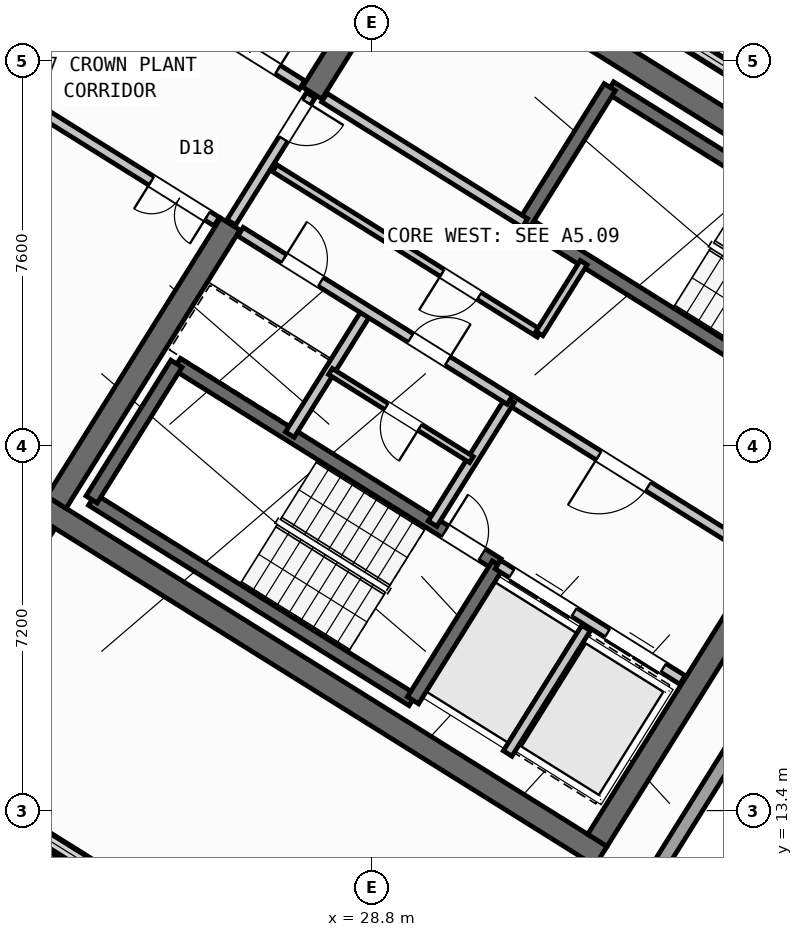
"""IFC4 building model, lengths in metres.
Left out: names, types, materials, properties, quantities, classifications, styles, units other than length and angle.
Written with IfcOpenShell. Run it as: python <this file> out.ifc"""

import sys

from ifc_helpers import new_model, si_unit, direction, frame, frame_2d, origin, origin_2d, place, context, subcontext, project, spatial, rectangle, hollow_rectangle, extrude, source, transform, mapped, element, fill, save


model = new_model("IFC4")
c1 = context("Model", 3, precision=1e-05, world=origin(), true_north=direction((0.0, 1.0)))
c2 = subcontext(c1, "Body", "Model", "MODEL_VIEW")
j1 = project(units=[si_unit("LENGTHUNIT", "METRE"), si_unit("PLANEANGLEUNIT", "RADIAN")], contexts=[c1])
p1 = place(None, origin())
s1 = spatial("IfcSite", under=j1, at=p1, CompositionType="ELEMENT")
p2 = place(p1, origin())
s2 = spatial("IfcBuilding", under=s1, at=p2, CompositionType="ELEMENT")
p3 = place(p2, frame((0.0, 0.0, 302.4)))
s3 = spatial("IfcBuildingStorey", under=s2, at=p3, CompositionType="ELEMENT", Elevation=302.4)
p4 = place(p3, frame((40.531, 24.036, 0.0), z_axis=(0.0, 0.0, 1.0), x_axis=(-0.848048787466, 0.529918157905, 0.0)))
e1 = element("IfcWall", 1, at=p4, inside=s3, PredefinedType="SHEAR", context=c2, shape_type="SweptSolid", body=[
    extrude(rectangle(XDim=13.04, YDim=0.45, at=frame_2d((6.52, 0.0))), origin(), (0.0, 0.0, 1.0), 3.32),
])
p5 = place(p3, frame((33.324, 12.503, 0.0), z_axis=(0.0, 0.0, 1.0), x_axis=(-0.848043529849, 0.529926571782, 0.0)))
e2 = element("IfcWall", 2, at=p5, inside=s3, PredefinedType="SHEAR", context=c2, shape_type="SweptSolid", body=[
    extrude(rectangle(XDim=13.04, YDim=0.45, at=frame_2d((6.52, 0.0))), origin(), (0.0, 0.0, 1.0), 3.32),
])
p6 = place(p3, frame((36.683, 18.304, 0.0), z_axis=(0.0, 0.0, 1.0), x_axis=(-0.529904039071, -0.848057609704, 0.0)))
e3 = element("IfcWall", 3, at=p6, inside=s3, PredefinedType="SHEAR", context=c2, shape_type="SweptSolid", body=[
    extrude(rectangle(XDim=6.475, YDim=0.45, at=frame_2d((3.238, 0.0))), origin(), (0.0, 0.0, 1.0), 3.32),
])
p7 = place(p3, frame((29.544, 30.636, 0.0), z_axis=(0.0, 0.0, 1.0), x_axis=(-0.529902075036, -0.848058836916, 0.0)))
e4 = element("IfcWall", 4, at=p7, inside=s3, PredefinedType="SHEAR", context=c2, shape_type="SweptSolid", body=[
    extrude(rectangle(XDim=3.625, YDim=0.45, at=frame_2d((1.812, 0.0))), origin(), (0.0, 0.0, 1.0), 3.32),
])
p8 = place(p3, frame((26.007, 24.976, 0.0), z_axis=(0.0, 0.0, 1.0), x_axis=(-0.529931155655, -0.848040665456, 0.0)))
e5 = element("IfcWall", 5, at=p8, inside=s3, PredefinedType="SHEAR", context=c2, shape_type="SweptSolid", body=[
    extrude(rectangle(XDim=6.475, YDim=0.45, at=frame_2d((3.238, 0.0))), origin(), (0.0, 0.0, 1.0), 3.32),
])
m1 = source(origin(), c2, "Body", "SweptSolid", [
    extrude(hollow_rectangle(XDim=0.5, YDim=0.5, WallThickness=0.025, at=origin_2d()), origin(), (0.0, 0.0, 1.0), 3.6),
])
p9 = place(p3, frame((22.191, 18.87, 0.0), z_axis=(0.0, 0.0, 1.0), x_axis=(-0.848048096156, 0.529919264233, 0.0)))
e6 = element("IfcColumn", 6, at=p9, inside=s3, PredefinedType="COLUMN", context=c2, shape_type="MappedRepresentation", body=[
    mapped(m1, transform((0.0, 0.0, 0.0), scale=1.0)),
])
p10 = place(p3, frame((29.124, 7.286, 0.0), z_axis=(0.0, 0.0, 1.0), x_axis=(-0.848048671495, 0.529918343499, 0.0)))
e7 = element("IfcWall", 7, at=p10, inside=s3, PredefinedType="PARAPET", context=c2, shape_type="SweptSolid", body=[
    extrude(rectangle(XDim=22.056, YDim=0.24, at=frame_2d((11.028, 0.0))), origin(), (0.0, 0.0, 1.0), 1.15),
])
p11 = place(p3, frame((12.5, 18.652, 0.0), z_axis=(0.0, 0.0, 1.0), x_axis=(0.848048578208, -0.529918492789, 0.0)))
e8 = element("IfcWall", 8, at=p11, inside=s3, PredefinedType="PARAPET", context=c2, shape_type="SweptSolid", body=[
    extrude(rectangle(XDim=20.187, YDim=0.24, at=frame_2d((10.094, 0.0))), origin(), (0.0, 0.0, 1.0), 1.15),
])
p12 = place(p3, frame((41.182, 23.031, 0.0), z_axis=(0.0, 0.0, 1.0), x_axis=(-0.529918482735, -0.84804858449, 0.0)))
e9 = element("IfcWall", 9, at=p12, inside=s3, PredefinedType="STANDARD", context=c2, shape_type="SweptSolid", body=[
    extrude(rectangle(XDim=17.184, YDim=0.28, at=frame_2d((8.592, 0.0))), origin(), (0.0, 0.0, 1.0), 3.32),
])
p13 = place(p12, frame((7.967, 0.0, 0.95)))
e10 = element("IfcOpeningElement", 10, at=p13, cuts=e9, PredefinedType="OPENING", context=c2, shape_type="SweptSolid", body=[
    extrude(rectangle(XDim=1.25, YDim=1.4, at=frame_2d((0.625, 0.7))), frame((0.0, 0.15, 0.0), z_axis=(0.0, -1.0, 0.0), x_axis=(1.0, 0.0, 0.0)), (0.0, 0.0, 1.0), 0.3),
])
p14 = place(p3, frame((30.122, 8.007, 0.0), z_axis=(0.0, 0.0, 1.0), x_axis=(-0.848046669074, 0.529921548036, 0.0)))
e11 = element("IfcWall", 11, at=p14, inside=s3, PredefinedType="STANDARD", context=c2, shape_type="SweptSolid", body=[
    extrude(rectangle(XDim=20.984, YDim=0.28, at=frame_2d((10.492, 0.0))), origin(), (0.0, 0.0, 1.0), 3.32),
])
p15 = place(p14, frame((8.009, 0.0, 0.95)))
e12 = element("IfcOpeningElement", 12, at=p15, cuts=e11, PredefinedType="OPENING", context=c2, shape_type="SweptSolid", body=[
    extrude(rectangle(XDim=1.25, YDim=1.4, at=frame_2d((0.625, 0.7))), frame((0.0, 0.15, 0.0), z_axis=(0.0, -1.0, 0.0), x_axis=(1.0, 0.0, 0.0)), (0.0, 0.0, 1.0), 0.3),
])
p16 = place(p14, frame((18.601, 0.0, 0.95)))
e13 = element("IfcOpeningElement", 13, at=p16, cuts=e11, PredefinedType="OPENING", context=c2, shape_type="SweptSolid", body=[
    extrude(rectangle(XDim=1.25, YDim=1.4, at=frame_2d((0.625, 0.7))), frame((0.0, 0.15, 0.0), z_axis=(0.0, -1.0, 0.0), x_axis=(1.0, 0.0, 0.0)), (0.0, 0.0, 1.0), 0.3),
])
p17 = place(p3, frame((22.935, 36.104, 0.0), z_axis=(0.0, 0.0, 1.0), x_axis=(0.848046669074, -0.529921548036, 0.0)))
e14 = element("IfcWall", 14, at=p17, inside=s3, PredefinedType="STANDARD", context=c2, shape_type="SweptSolid", body=[
    extrude(rectangle(XDim=20.984, YDim=0.28, at=frame_2d((10.492, 0.0))), origin(), (0.0, 0.0, 1.0), 3.32),
])
p18 = place(p17, frame((3.551, 0.0, 0.95)))
e15 = element("IfcOpeningElement", 15, at=p18, cuts=e14, PredefinedType="OPENING", context=c2, shape_type="SweptSolid", body=[
    extrude(rectangle(XDim=1.25, YDim=1.4, at=frame_2d((0.625, 0.7))), frame((0.0, 0.15, 0.0), z_axis=(0.0, -1.0, 0.0), x_axis=(1.0, 0.0, 0.0)), (0.0, 0.0, 1.0), 0.3),
])
p19 = place(p17, frame((14.193, 0.0, 0.95)))
e16 = element("IfcOpeningElement", 16, at=p19, cuts=e14, PredefinedType="OPENING", context=c2, shape_type="SweptSolid", body=[
    extrude(rectangle(XDim=1.25, YDim=1.4, at=frame_2d((0.625, 0.7))), frame((0.0, 0.15, 0.0), z_axis=(0.0, -1.0, 0.0), x_axis=(1.0, 0.0, 0.0)), (0.0, 0.0, 1.0), 0.3),
])
p20 = place(p3, frame((29.605, 15.581, 0.0), z_axis=(0.0, 0.0, 1.0), x_axis=(-0.848036911448, 0.529937163087, 0.0)))
e17 = element("IfcWall", 17, at=p20, inside=s3, PredefinedType="SHEAR", context=c2, shape_type="SweptSolid", body=[
    extrude(rectangle(XDim=7.46, YDim=0.26, at=frame_2d((3.73, 0.0))), origin(), (0.0, 0.0, 1.0), 3.32),
])
p21 = place(p3, frame((31.28, 18.261, 0.0), z_axis=(0.0, 0.0, 1.0), x_axis=(-0.848051618787, 0.529913626805, 0.0)))
e18 = element("IfcWall", 18, at=p21, inside=s3, PredefinedType="SHEAR", context=c2, shape_type="SweptSolid", body=[
    extrude(rectangle(XDim=7.46, YDim=0.26, at=frame_2d((3.73, 0.0))), origin(), (0.0, 0.0, 1.0), 3.32),
])
p22 = place(p21, frame((0.36, 0.0, 0.0)))
e19 = element("IfcOpeningElement", 19, at=p22, cuts=e18, PredefinedType="OPENING", context=c2, shape_type="SweptSolid", body=[
    extrude(rectangle(XDim=0.86, YDim=2.05, at=frame_2d((0.43, 1.025))), frame((0.0, 0.14, 0.0), z_axis=(0.0, -1.0, 0.0), x_axis=(1.0, 0.0, 0.0)), (0.0, 0.0, 1.0), 0.28),
])
p23 = place(p3, frame((31.288, 18.256, 0.0), z_axis=(0.0, 0.0, 1.0), x_axis=(-0.529943379326, -0.848033026897, 0.0)))
e20 = element("IfcWall", 20, at=p23, inside=s3, PredefinedType="SHEAR", context=c2, shape_type="SweptSolid", body=[
    extrude(rectangle(XDim=3.16, YDim=0.26, at=frame_2d((1.58, 0.0))), origin(), (0.0, 0.0, 1.0), 3.32),
])
p24 = place(p3, frame((24.945, 22.22, 0.0), z_axis=(0.0, 0.0, 1.0), x_axis=(-0.529908658664, -0.84805472316, 0.0)))
e21 = element("IfcWall", 21, at=p24, inside=s3, PredefinedType="SHEAR", context=c2, shape_type="SweptSolid", body=[
    extrude(rectangle(XDim=3.16, YDim=0.26, at=frame_2d((1.58, 0.0))), origin(), (0.0, 0.0, 1.0), 3.32),
])
p25 = place(p3, frame((39.721, 23.788, 0.0), z_axis=(0.0, 0.0, 1.0), x_axis=(-0.848054434086, 0.529909121291, 0.0)))
e22 = element("IfcWall", 22, at=p25, inside=s3, PredefinedType="SHEAR", context=c2, shape_type="SweptSolid", body=[
    extrude(rectangle(XDim=7.33, YDim=0.26, at=frame_2d((3.665, 0.0))), origin(), (0.0, 0.0, 1.0), 3.32),
])
p26 = place(p3, frame((38.046, 21.108, 0.0), z_axis=(0.0, 0.0, 1.0), x_axis=(-0.848054434086, 0.529909121291, 0.0)))
e23 = element("IfcWall", 23, at=p26, inside=s3, PredefinedType="SHEAR", context=c2, shape_type="SweptSolid", body=[
    extrude(rectangle(XDim=7.33, YDim=0.26, at=frame_2d((3.665, 0.0))), origin(), (0.0, 0.0, 1.0), 3.32),
])
p27 = place(p26, frame((0.22, 0.0, 0.0)))
e24 = element("IfcOpeningElement", 24, at=p27, cuts=e23, PredefinedType="OPENING", context=c2, shape_type="SweptSolid", body=[
    extrude(rectangle(XDim=1.1, YDim=2.1, at=frame_2d((0.55, 1.05))), frame((0.0, 0.14, 0.0), z_axis=(0.0, -1.0, 0.0), x_axis=(1.0, 0.0, 0.0)), (0.0, 0.0, 1.0), 0.28),
])
p28 = place(p3, frame((33.496, 27.677, 0.0), z_axis=(0.0, 0.0, 1.0), x_axis=(-0.529908658664, -0.84805472316, 0.0)))
e25 = element("IfcWall", 25, at=p28, inside=s3, PredefinedType="SHEAR", context=c2, shape_type="SweptSolid", body=[
    extrude(rectangle(XDim=3.16, YDim=0.26, at=frame_2d((1.58, 0.0))), origin(), (0.0, 0.0, 1.0), 3.32),
])
p29 = place(p3, frame((34.933, 15.978, 0.0), z_axis=(0.0, 0.0, 1.0), x_axis=(-0.848055739377, 0.529907032327, 0.0)))
e26 = element("IfcWall", 26, at=p29, inside=s3, PredefinedType="STANDARD", context=c2, shape_type="SweptSolid", body=[
    extrude(rectangle(XDim=4.298, YDim=0.2, at=frame_2d((2.149, 0.0))), origin(), (0.0, 0.0, 1.0), 3.31),
])
p30 = place(p29, frame((0.448, 0.0, 0.0)))
e27 = element("IfcOpeningElement", 27, at=p30, cuts=e26, PredefinedType="OPENING", context=c2, shape_type="SweptSolid", body=[
    extrude(rectangle(XDim=1.3, YDim=2.2, at=frame_2d((0.65, 1.1))), frame((0.0, 0.11, 0.0), z_axis=(0.0, -1.0, 0.0), x_axis=(1.0, 0.0, 0.0)), (0.0, 0.0, 1.0), 0.22),
])
p31 = place(p29, frame((2.523, 0.0, 0.0)))
e28 = element("IfcOpeningElement", 28, at=p31, cuts=e26, PredefinedType="OPENING", context=c2, shape_type="SweptSolid", body=[
    extrude(rectangle(XDim=1.45, YDim=2.25, at=frame_2d((0.725, 1.125))), frame((0.0, 0.11, 0.0), z_axis=(0.0, -1.0, 0.0), x_axis=(1.0, 0.0, 0.0)), (0.0, 0.0, 1.0), 0.22),
])
p32 = place(p3, frame((36.459, 18.421, 0.0), z_axis=(0.0, 0.0, 1.0), x_axis=(-0.848059591691, 0.529900867089, 0.0)))
e29 = element("IfcWall", 29, at=p32, inside=s3, PredefinedType="STANDARD", context=c2, shape_type="SweptSolid", body=[
    extrude(rectangle(XDim=5.818, YDim=0.2, at=frame_2d((2.909, 0.0))), origin(), (0.0, 0.0, 1.0), 3.31),
])
p33 = place(p32, frame((2.598, 0.0, 0.0)))
e30 = element("IfcOpeningElement", 30, at=p33, cuts=e29, PredefinedType="OPENING", context=c2, shape_type="SweptSolid", body=[
    extrude(rectangle(XDim=1.15, YDim=2.1, at=frame_2d((0.575, 1.05))), frame((0.0, 0.11, 0.0), z_axis=(0.0, -1.0, 0.0), x_axis=(1.0, 0.0, 0.0)), (0.0, 0.0, 1.0), 0.22),
])
p34 = place(p3, frame((31.822, 24.998, 0.0), z_axis=(0.0, 0.0, 1.0), x_axis=(-0.848054125777, 0.529909614701, 0.0)))
e31 = element("IfcWall", 31, at=p34, inside=s3, PredefinedType="STANDARD", context=c2, shape_type="SweptSolid", body=[
    extrude(rectangle(XDim=4.668, YDim=0.2, at=frame_2d((2.334, 0.0))), origin(), (0.0, 0.0, 1.0), 3.31),
])
p35 = place(p3, frame((32.108, 22.814, 0.0), z_axis=(0.0, 0.0, 1.0), x_axis=(-0.848047283855, 0.529920564185, 0.0)))
e32 = element("IfcWall", 32, at=p35, inside=s3, PredefinedType="PARTITIONING", context=c2, shape_type="SweptSolid", body=[
    extrude(rectangle(XDim=6.16, YDim=0.16, at=frame_2d((3.08, 0.0))), origin(), (0.0, 0.0, 1.0), 3.31),
])
p36 = place(p35, frame((1.4, 0.0, 0.0)))
e33 = element("IfcOpeningElement", 33, at=p36, cuts=e32, PredefinedType="OPENING", context=c2, shape_type="SweptSolid", body=[
    extrude(rectangle(XDim=0.86, YDim=2.05, at=frame_2d((0.43, 1.025))), frame((0.0, 0.09, 0.0), z_axis=(0.0, -1.0, 0.0), x_axis=(1.0, 0.0, 0.0)), (0.0, 0.0, 1.0), 0.18),
])
p37 = place(p3, frame((32.982, 24.213, 0.0), z_axis=(0.0, 0.0, 1.0), x_axis=(-0.529839334948, -0.84809803628, 0.0)))
e34 = element("IfcWall", 34, at=p37, inside=s3, PredefinedType="PARTITIONING", context=c2, shape_type="SweptSolid", body=[
    extrude(rectangle(XDim=1.65, YDim=0.16, at=frame_2d((0.825, 0.0))), origin(), (0.0, 0.0, 1.0), 3.31),
])
p38 = place(p3, frame((33.029, 17.003, 0.0), z_axis=(0.0, 0.0, 1.0), x_axis=(-0.529916267533, -0.848049968695, 0.0)))
e35 = element("IfcWall", 35, at=p38, inside=s3, PredefinedType="STANDARD", context=c2, shape_type="SweptSolid", body=[
    extrude(rectangle(XDim=2.92, YDim=0.2, at=frame_2d((1.46, 0.0))), origin(), (0.0, 0.0, 1.0), 3.31),
])
for number, where, z_axis, x_axis in (
    (36, (31.525, 21.504, 0.0), (0.0, 0.0, 1.0), (-0.53, -0.848, 0.0)),
    (37, (28.71, 23.263, 0.0), (0.0, 0.0, 1.0), (-0.53, -0.848, 0.0)),
):
    element("IfcWall", number, at=place(p3, frame(where, z_axis=z_axis, x_axis=x_axis)), inside=s3, PredefinedType="STANDARD", context=c2, shape_type="SweptSolid", body=[
        extrude(rectangle(XDim=2.88, YDim=0.2, at=frame_2d((1.44, 0.0))), origin(), (0.0, 0.0, 1.0), 3.31),
    ])
p39 = place(p3, frame((31.525, 21.504, 0.0), z_axis=(0.0, 0.0, 1.0), x_axis=(-0.848042066329, 0.529928913853, 0.0)))
e38 = element("IfcWall", 38, at=p39, inside=s3, PredefinedType="STANDARD", context=c2, shape_type="SweptSolid", body=[
    extrude(rectangle(XDim=6.268, YDim=0.2, at=frame_2d((3.134, 0.0))), origin(), (0.0, 0.0, 1.0), 3.31),
])
p40 = place(p39, frame((4.4, 0.0, 0.0)))
e39 = element("IfcOpeningElement", 39, at=p40, cuts=e38, PredefinedType="OPENING", context=c2, shape_type="SweptSolid", body=[
    extrude(rectangle(XDim=0.86, YDim=2.05, at=frame_2d((0.43, 1.025))), frame((0.0, 0.11, 0.0), z_axis=(0.0, -1.0, 0.0), x_axis=(1.0, 0.0, 0.0)), (0.0, 0.0, 1.0), 0.22),
])
p41 = place(p39, frame((1.45, 0.0, 0.0)))
e40 = element("IfcOpeningElement", 40, at=p41, cuts=e38, PredefinedType="OPENING", context=c2, shape_type="SweptSolid", body=[
    extrude(rectangle(XDim=0.86, YDim=2.05, at=frame_2d((0.43, 1.025))), frame((0.0, 0.11, 0.0), z_axis=(0.0, -1.0, 0.0), x_axis=(1.0, 0.0, 0.0)), (0.0, 0.0, 1.0), 0.22),
])
p42 = place(p3, frame((30.766, 20.327, 0.0), z_axis=(0.0, 0.0, 1.0), x_axis=(-0.848052663127, 0.529911955482, 0.0)))
e41 = element("IfcWall", 41, at=p42, inside=s3, PredefinedType="PLUMBINGWALL", context=c2, shape_type="SweptSolid", body=[
    extrude(rectangle(XDim=3.28, YDim=0.14, at=frame_2d((1.64, 0.0))), origin(), (0.0, 0.0, 1.0), 3.31),
])
p43 = place(p42, frame((1.2, 0.0, 0.0)))
e42 = element("IfcOpeningElement", 42, at=p43, cuts=e41, PredefinedType="OPENING", context=c2, shape_type="SweptSolid", body=[
    extrude(rectangle(XDim=0.78, YDim=2.05, at=frame_2d((0.39, 1.025))), frame((0.0, 0.08, 0.0), z_axis=(0.0, -1.0, 0.0), x_axis=(1.0, 0.0, 0.0)), (0.0, 0.0, 1.0), 0.16),
])
p44 = place(p3, frame((27.596, 27.52, 0.0), z_axis=(0.0, 0.0, 1.0), x_axis=(-0.529865479138, -0.848081702443, 0.0)))
e43 = element("IfcWall", 43, at=p44, inside=s3, PredefinedType="STANDARD", context=c2, shape_type="SweptSolid", body=[
    extrude(rectangle(XDim=2.96, YDim=0.2, at=frame_2d((1.48, 0.0))), origin(), (0.0, 0.0, 1.0), 3.31),
])
p45 = place(p44, frame((0.16, 0.0, 0.0)))
e44 = element("IfcOpeningElement", 44, at=p45, cuts=e43, PredefinedType="OPENING", context=c2, shape_type="SweptSolid", body=[
    extrude(rectangle(XDim=0.86, YDim=2.05, at=frame_2d((0.43, 1.025))), frame((0.0, 0.11, 0.0), z_axis=(0.0, -1.0, 0.0), x_axis=(1.0, 0.0, 0.0)), (0.0, 0.0, 1.0), 0.22),
])
p46 = place(p3, frame((25.74, 25.025, 0.0), z_axis=(0.0, 0.0, 1.0), x_axis=(-0.848050737672, 0.529915036902, 0.0)))
e45 = element("IfcWall", 45, at=p46, inside=s3, PredefinedType="STANDARD", context=c2, shape_type="SweptSolid", body=[
    extrude(rectangle(XDim=9.678, YDim=0.2, at=frame_2d((4.839, 0.0))), origin(), (0.0, 0.0, 1.0), 3.31),
])
p47 = place(p46, frame((0.218, 0.0, 0.0)))
e46 = element("IfcOpeningElement", 46, at=p47, cuts=e45, PredefinedType="OPENING", context=c2, shape_type="SweptSolid", body=[
    extrude(rectangle(XDim=1.3, YDim=2.15, at=frame_2d((0.65, 1.075))), frame((0.0, 0.11, 0.0), z_axis=(0.0, -1.0, 0.0), x_axis=(1.0, 0.0, 0.0)), (0.0, 0.0, 1.0), 0.22),
])
p48 = place(p46, frame((5.003, 0.0, 0.0)))
e47 = element("IfcOpeningElement", 47, at=p48, cuts=e45, PredefinedType="OPENING", context=c2, shape_type="SweptSolid", body=[
    extrude(rectangle(XDim=1.3, YDim=2.15, at=frame_2d((0.65, 1.075))), frame((0.0, 0.11, 0.0), z_axis=(0.0, -1.0, 0.0), x_axis=(1.0, 0.0, 0.0)), (0.0, 0.0, 1.0), 0.22),
])
p49 = place(p3, frame((27.425, 27.721, 0.0), z_axis=(0.0, 0.0, 1.0), x_axis=(-0.848057821392, 0.529903700285, 0.0)))
e48 = element("IfcWall", 48, at=p49, inside=s3, PredefinedType="STANDARD", context=c2, shape_type="SweptSolid", body=[
    extrude(rectangle(XDim=9.678, YDim=0.2, at=frame_2d((4.839, 0.0))), origin(), (0.0, 0.0, 1.0), 3.31),
])
p50 = place(p49, frame((0.568, 0.0, 0.0)))
e49 = element("IfcOpeningElement", 49, at=p50, cuts=e48, PredefinedType="OPENING", context=c2, shape_type="SweptSolid", body=[
    extrude(rectangle(XDim=1.3, YDim=2.15, at=frame_2d((0.65, 1.075))), frame((0.0, 0.11, 0.0), z_axis=(0.0, -1.0, 0.0), x_axis=(1.0, 0.0, 0.0)), (0.0, 0.0, 1.0), 0.22),
])
m2 = source(origin(), c2, "Body", "SweptSolid", [
    extrude(rectangle(XDim=1.25, YDim=1.4, at=frame_2d((0.625, 0.7))), frame((0.0, 0.03, 0.0), z_axis=(0.0, -1.0, 0.0), x_axis=(1.0, 0.0, 0.0)), (0.0, 0.0, 1.0), 0.06),
])
p51 = place(p15, origin())
e50 = element("IfcWindow", 50, at=p51, inside=s3, PartitioningType="SINGLE_PANEL", PredefinedType="WINDOW", context=c2, shape_type="MappedRepresentation", body=[
    mapped(m2, transform((0.0, 0.0, 0.0), scale=1.0)),
])
fill(e12, e50)
p52 = place(p19, origin())
e51 = element("IfcWindow", 51, at=p52, inside=s3, PartitioningType="SINGLE_PANEL", PredefinedType="WINDOW", context=c2, shape_type="MappedRepresentation", body=[
    mapped(m2, transform((0.0, 0.0, 0.0), scale=1.0)),
])
fill(e16, e51)
m3 = source(origin(), c2, "Body", "SweptSolid", [
    extrude(rectangle(XDim=0.86, YDim=2.05, at=frame_2d((0.43, 1.025))), frame((0.0, 0.025, 0.0), z_axis=(0.0, -1.0, 0.0), x_axis=(1.0, 0.0, 0.0)), (0.0, 0.0, 1.0), 0.05),
])
p53 = place(p22, frame((0.86, 0.0, 0.0), z_axis=(0.0, 0.0, 1.0), x_axis=(-1.0, 0.0, 0.0)))
e52 = element("IfcDoor", 52, at=p53, inside=s3, OperationType="SINGLE_SWING_LEFT", PredefinedType="DOOR", context=c2, shape_type="MappedRepresentation", body=[
    mapped(m3, transform((0.0, 0.0, 0.0), scale=1.0)),
])
fill(e19, e52)
p54 = place(p36, origin())
e53 = element("IfcDoor", 53, at=p54, inside=s3, OperationType="SINGLE_SWING_RIGHT", PredefinedType="DOOR", context=c2, shape_type="MappedRepresentation", body=[
    mapped(m3, transform((0.0, 0.0, 0.0), scale=1.0)),
])
fill(e33, e53)
m4 = source(origin(), c2, "Body", "SweptSolid", [
    extrude(rectangle(XDim=1.15, YDim=2.1, at=frame_2d((0.575, 1.05))), frame((0.0, 0.025, 0.0), z_axis=(0.0, -1.0, 0.0), x_axis=(1.0, 0.0, 0.0)), (0.0, 0.0, 1.0), 0.05),
])
p55 = place(p33, origin())
e54 = element("IfcDoor", 54, at=p55, inside=s3, OperationType="SINGLE_SWING_RIGHT", PredefinedType="DOOR", context=c2, shape_type="MappedRepresentation", body=[
    mapped(m4, transform((0.0, 0.0, 0.0), scale=1.0)),
])
fill(e30, e54)
m5 = source(origin(), c2, "Body", "SweptSolid", [
    extrude(rectangle(XDim=1.3, YDim=2.2, at=frame_2d((0.65, 1.1))), frame((0.0, 0.025, 0.0), z_axis=(0.0, -1.0, 0.0), x_axis=(1.0, 0.0, 0.0)), (0.0, 0.0, 1.0), 0.05),
])
p56 = place(p30, origin())
e55 = element("IfcDoor", 55, at=p56, inside=s3, OperationType="DOUBLE_DOOR_SLIDING", PredefinedType="DOOR", context=c2, shape_type="MappedRepresentation", body=[
    mapped(m5, transform((0.0, 0.0, 0.0), scale=1.0)),
])
fill(e27, e55)
m6 = source(origin(), c2, "Body", "SweptSolid", [
    extrude(rectangle(XDim=1.45, YDim=2.25, at=frame_2d((0.725, 1.125))), frame((0.0, 0.025, 0.0), z_axis=(0.0, -1.0, 0.0), x_axis=(1.0, 0.0, 0.0)), (0.0, 0.0, 1.0), 0.05),
])
p57 = place(p31, origin())
e56 = element("IfcDoor", 56, at=p57, inside=s3, OperationType="DOUBLE_DOOR_SLIDING", PredefinedType="DOOR", context=c2, shape_type="MappedRepresentation", body=[
    mapped(m6, transform((0.0, 0.0, 0.0), scale=1.0)),
])
fill(e28, e56)
p58 = place(p40, frame((0.86, 0.0, 0.0), z_axis=(0.0, 0.0, 1.0), x_axis=(-1.0, 0.0, 0.0)))
e57 = element("IfcDoor", 57, at=p58, inside=s3, OperationType="SINGLE_SWING_LEFT", PredefinedType="DOOR", context=c2, shape_type="MappedRepresentation", body=[
    mapped(m3, transform((0.0, 0.0, 0.0), scale=1.0)),
])
fill(e39, e57)
p59 = place(p41, frame((0.86, 0.0, 0.0), z_axis=(0.0, 0.0, 1.0), x_axis=(-1.0, 0.0, 0.0)))
e58 = element("IfcDoor", 58, at=p59, inside=s3, OperationType="SINGLE_SWING_RIGHT", PredefinedType="DOOR", context=c2, shape_type="MappedRepresentation", body=[
    mapped(m3, transform((0.0, 0.0, 0.0), scale=1.0)),
])
fill(e40, e58)
m7 = source(origin(), c2, "Body", "SweptSolid", [
    extrude(rectangle(XDim=0.78, YDim=2.05, at=frame_2d((0.39, 1.025))), frame((0.0, 0.025, 0.0), z_axis=(0.0, -1.0, 0.0), x_axis=(1.0, 0.0, 0.0)), (0.0, 0.0, 1.0), 0.05),
])
p60 = place(p43, origin())
e59 = element("IfcDoor", 59, at=p60, inside=s3, OperationType="SINGLE_SWING_LEFT", PredefinedType="DOOR", context=c2, shape_type="MappedRepresentation", body=[
    mapped(m7, transform((0.0, 0.0, 0.0), scale=1.0)),
])
fill(e42, e59)
p61 = place(p45, origin())
e60 = element("IfcDoor", 60, at=p61, inside=s3, OperationType="SINGLE_SWING_LEFT", PredefinedType="DOOR", context=c2, shape_type="MappedRepresentation", body=[
    mapped(m3, transform((0.0, 0.0, 0.0), scale=1.0)),
])
fill(e44, e60)
m8 = source(origin(), c2, "Body", "SweptSolid", [
    extrude(rectangle(XDim=1.3, YDim=2.15, at=frame_2d((0.65, 1.075))), frame((0.0, 0.025, 0.0), z_axis=(0.0, -1.0, 0.0), x_axis=(1.0, 0.0, 0.0)), (0.0, 0.0, 1.0), 0.05),
])
p62 = place(p47, origin())
e61 = element("IfcDoor", 61, at=p62, inside=s3, OperationType="DOUBLE_DOOR_SINGLE_SWING", PredefinedType="DOOR", context=c2, shape_type="MappedRepresentation", body=[
    mapped(m8, transform((0.0, 0.0, 0.0), scale=1.0)),
])
fill(e46, e61)
p63 = place(p50, frame((1.3, 0.0, 0.0), z_axis=(0.0, 0.0, 1.0), x_axis=(-1.0, 0.0, 0.0)))
e62 = element("IfcDoor", 62, at=p63, inside=s3, OperationType="DOUBLE_DOOR_SINGLE_SWING", PredefinedType="DOOR", context=c2, shape_type="MappedRepresentation", body=[
    mapped(m8, transform((0.0, 0.0, 0.0), scale=1.0)),
])
fill(e49, e62)
save(model, sys.argv[1])
